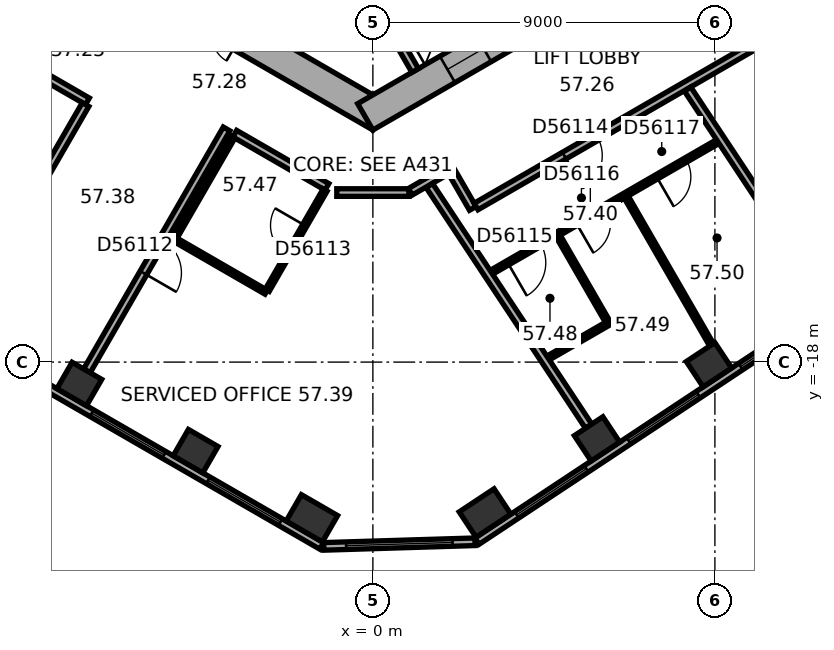
"""IFC4 building model, lengths in metres.
Left out: names, types, materials, properties, quantities, classifications, styles, units other than length and angle.
Written with IfcOpenShell. Run it as: python <this file> out.ifc"""

import sys

from ifc_helpers import new_model, si_unit, direction, frame, frame_2d, origin, origin_2d, place, context, subcontext, project, spatial, rectangle, extrude, element, fill, save


model = new_model("IFC4")
c1 = context("Model", 3, precision=1e-05, world=origin(), true_north=direction((0.0, 1.0)))
c2 = subcontext(c1, "Body", "Model", "MODEL_VIEW")
j1 = project(units=[si_unit("LENGTHUNIT", "METRE"), si_unit("PLANEANGLEUNIT", "RADIAN")], contexts=[c1])
p1 = place(None, origin())
s1 = spatial("IfcSite", under=j1, at=p1, CompositionType="ELEMENT")
p2 = place(p1, origin())
s2 = spatial("IfcBuilding", under=s1, at=p2, CompositionType="ELEMENT")
p3 = place(p2, frame((0.0, 0.0, 232.8)))
s3 = spatial("IfcBuildingStorey", under=s2, at=p3, CompositionType="ELEMENT", Elevation=232.8)
for number, where, z_axis, x_axis in (
    (1, (-7.725, -18.576, 0.0), (0.0, 0.0, 1.0), (0.866, -0.5, 0.0)),
    (2, (-4.665, -20.343, 0.0), (0.0, 0.0, 1.0), (0.866, -0.5, 0.0)),
):
    element("IfcColumn", number, at=place(p3, frame(where, z_axis=z_axis, x_axis=x_axis)), inside=s3, PredefinedType="COLUMN", context=c2, shape_type="SweptSolid", body=[
        extrude(rectangle(XDim=0.9, YDim=0.8, at=origin_2d()), origin(), (0.0, 0.0, 1.0), 3.7),
    ])
for number, where, z_axis, x_axis in (
    (3, (-1.604, -22.11, 0.0), (0.0, 0.0, 1.0), (0.866, -0.5, 0.0)),
    (4, (2.951, -21.971, 0.0), (0.0, 0.0, 1.0), (0.834, 0.552, 0.0)),
):
    element("IfcColumn", number, at=place(p3, frame(where, z_axis=z_axis, x_axis=x_axis)), inside=s3, PredefinedType="COLUMN", context=c2, shape_type="SweptSolid", body=[
        extrude(rectangle(XDim=1.1, YDim=0.8, at=origin_2d()), origin(), (0.0, 0.0, 1.0), 3.7),
    ])
for number, where, z_axis, x_axis in (
    (5, (5.898, -20.021, 0.0), (0.0, 0.0, 1.0), (0.834, 0.552, 0.0)),
    (6, (8.844, -18.07, 0.0), (0.0, 0.0, 1.0), (0.834, 0.552, 0.0)),
):
    element("IfcColumn", number, at=place(p3, frame(where, z_axis=z_axis, x_axis=x_axis)), inside=s3, PredefinedType="COLUMN", context=c2, shape_type="SweptSolid", body=[
        extrude(rectangle(XDim=0.9, YDim=0.8, at=origin_2d()), origin(), (0.0, 0.0, 1.0), 3.7),
    ])
p4 = place(p3, frame((-10.1, -5.6, 0.0), z_axis=(0.0, 0.0, 1.0), x_axis=(0.866023897231, -0.500002609418, 0.0)))
e7 = element("IfcWall", 7, at=p4, inside=s3, PredefinedType="SHEAR", context=c2, shape_type="SweptSolid", body=[
    extrude(rectangle(XDim=11.894, YDim=0.8, at=frame_2d((5.947, 0.0))), origin(), (0.0, 0.0, 1.0), 3.7),
])
p5 = place(p4, frame((6.147, 0.0, 0.0)))
e8 = element("IfcOpeningElement", 8, at=p5, cuts=e7, PredefinedType="OPENING", context=c2, shape_type="SweptSolid", body=[
    extrude(rectangle(XDim=1.5, YDim=2.1, at=frame_2d((0.75, 1.05))), frame((0.0, 0.41, 0.0), z_axis=(0.0, -1.0, 0.0), x_axis=(1.0, 0.0, 0.0)), (0.0, 0.0, 1.0), 0.82),
])
p6 = place(p4, frame((1.597, 0.0, 0.0)))
e9 = element("IfcOpeningElement", 9, at=p6, cuts=e7, PredefinedType="OPENING", context=c2, shape_type="SweptSolid", body=[
    extrude(rectangle(XDim=1.1, YDim=2.1, at=frame_2d((0.55, 1.05))), frame((0.0, 0.41, 0.0), z_axis=(0.0, -1.0, 0.0), x_axis=(1.0, 0.0, 0.0)), (0.0, 0.0, 1.0), 0.82),
])
p7 = place(p4, frame((4.197, 0.0, 0.0)))
e10 = element("IfcOpeningElement", 10, at=p7, cuts=e7, PredefinedType="OPENING", context=c2, shape_type="SweptSolid", body=[
    extrude(rectangle(XDim=1.1, YDim=2.1, at=frame_2d((0.55, 1.05))), frame((0.0, 0.41, 0.0), z_axis=(0.0, -1.0, 0.0), x_axis=(1.0, 0.0, 0.0)), (0.0, 0.0, 1.0), 0.82),
])
p8 = place(p3, frame((-0.2, -11.547, 0.0), z_axis=(0.0, 0.0, 1.0), x_axis=(0.866023897231, 0.500002609418, 0.0)))
e11 = element("IfcWall", 11, at=p8, inside=s3, PredefinedType="SHEAR", context=c2, shape_type="SweptSolid", body=[
    extrude(rectangle(XDim=11.894, YDim=0.8, at=frame_2d((5.947, 0.0))), origin(), (0.0, 0.0, 1.0), 3.7),
])
p9 = place(p8, frame((2.497, 0.0, 0.0)))
e12 = element("IfcOpeningElement", 12, at=p9, cuts=e11, PredefinedType="OPENING", context=c2, shape_type="SweptSolid", body=[
    extrude(rectangle(XDim=1.1, YDim=2.1, at=frame_2d((0.55, 1.05))), frame((0.0, 0.41, 0.0), z_axis=(0.0, -1.0, 0.0), x_axis=(1.0, 0.0, 0.0)), (0.0, 0.0, 1.0), 0.82),
])
p10 = place(p8, frame((5.097, 0.0, 0.0)))
e13 = element("IfcOpeningElement", 13, at=p10, cuts=e11, PredefinedType="OPENING", context=c2, shape_type="SweptSolid", body=[
    extrude(rectangle(XDim=1.1, YDim=2.1, at=frame_2d((0.55, 1.05))), frame((0.0, 0.41, 0.0), z_axis=(0.0, -1.0, 0.0), x_axis=(1.0, 0.0, 0.0)), (0.0, 0.0, 1.0), 0.82),
])
p11 = place(p8, frame((7.697, 0.0, 0.0)))
e14 = element("IfcOpeningElement", 14, at=p11, cuts=e11, PredefinedType="OPENING", context=c2, shape_type="SweptSolid", body=[
    extrude(rectangle(XDim=1.1, YDim=2.1, at=frame_2d((0.55, 1.05))), frame((0.0, 0.41, 0.0), z_axis=(0.0, -1.0, 0.0), x_axis=(1.0, 0.0, 0.0)), (0.0, 0.0, 1.0), 0.82),
])
p12 = place(p3, frame((-17.664, -13.415, 0.0), z_axis=(0.0, 0.0, 1.0), x_axis=(0.866026555358, -0.49999800541, 0.0)))
e15 = element("IfcWall", 15, at=p12, inside=s3, PredefinedType="STANDARD", context=c2, shape_type="SweptSolid", body=[
    extrude(rectangle(XDim=18.841, YDim=0.2, at=frame_2d((9.421, 0.0))), origin(), (0.0, 0.0, 1.0), 3.7),
])
p13 = place(p12, frame((1.254, 0.0, 0.9)))
e16 = element("IfcOpeningElement", 16, at=p13, cuts=e15, PredefinedType="OPENING", context=c2, shape_type="SweptSolid", body=[
    extrude(rectangle(XDim=2.2, YDim=2.0, at=frame_2d((1.1, 1.0))), frame((0.0, 0.11, 0.0), z_axis=(0.0, -1.0, 0.0), x_axis=(1.0, 0.0, 0.0)), (0.0, 0.0, 1.0), 0.22),
])
p14 = place(p12, frame((4.788, 0.0, 0.9)))
e17 = element("IfcOpeningElement", 17, at=p14, cuts=e15, PredefinedType="OPENING", context=c2, shape_type="SweptSolid", body=[
    extrude(rectangle(XDim=2.2, YDim=2.0, at=frame_2d((1.1, 1.0))), frame((0.0, 0.11, 0.0), z_axis=(0.0, -1.0, 0.0), x_axis=(1.0, 0.0, 0.0)), (0.0, 0.0, 1.0), 0.22),
])
p15 = place(p12, frame((8.322, 0.0, 0.9)))
e18 = element("IfcOpeningElement", 18, at=p15, cuts=e15, PredefinedType="OPENING", context=c2, shape_type="SweptSolid", body=[
    extrude(rectangle(XDim=2.2, YDim=2.0, at=frame_2d((1.1, 1.0))), frame((0.0, 0.11, 0.0), z_axis=(0.0, -1.0, 0.0), x_axis=(1.0, 0.0, 0.0)), (0.0, 0.0, 1.0), 0.22),
])
p16 = place(p12, frame((11.855, 0.0, 0.9)))
e19 = element("IfcOpeningElement", 19, at=p16, cuts=e15, PredefinedType="OPENING", context=c2, shape_type="SweptSolid", body=[
    extrude(rectangle(XDim=2.2, YDim=2.0, at=frame_2d((1.1, 1.0))), frame((0.0, 0.11, 0.0), z_axis=(0.0, -1.0, 0.0), x_axis=(1.0, 0.0, 0.0)), (0.0, 0.0, 1.0), 0.22),
])
p17 = place(p12, frame((15.389, 0.0, 0.9)))
e20 = element("IfcOpeningElement", 20, at=p17, cuts=e15, PredefinedType="OPENING", context=c2, shape_type="SweptSolid", body=[
    extrude(rectangle(XDim=2.2, YDim=2.0, at=frame_2d((1.1, 1.0))), frame((0.0, 0.11, 0.0), z_axis=(0.0, -1.0, 0.0), x_axis=(1.0, 0.0, 0.0)), (0.0, 0.0, 1.0), 0.22),
])
p18 = place(p3, frame((-1.294, -22.849, 0.0), z_axis=(0.0, 0.0, 1.0), x_axis=(0.999533952558, 0.030526671678, 0.0)))
e21 = element("IfcWall", 21, at=p18, inside=s3, PredefinedType="STANDARD", context=c2, shape_type="SweptSolid", body=[
    extrude(rectangle(XDim=3.983, YDim=0.2, at=frame_2d((1.991, 0.0))), origin(), (0.0, 0.0, 1.0), 3.7),
])
p19 = place(p18, frame((0.591, 0.0, 0.9)))
e22 = element("IfcOpeningElement", 22, at=p19, cuts=e21, PredefinedType="OPENING", context=c2, shape_type="SweptSolid", body=[
    extrude(rectangle(XDim=2.8, YDim=2.0, at=frame_2d((1.4, 1.0))), frame((0.0, 0.11, 0.0), z_axis=(0.0, -1.0, 0.0), x_axis=(1.0, 0.0, 0.0)), (0.0, 0.0, 1.0), 0.22),
])
p20 = place(p3, frame((2.739, -22.711, 0.0), z_axis=(0.0, 0.0, 1.0), x_axis=(0.833885723098, 0.551937134838, 0.0)))
e23 = element("IfcWall", 23, at=p20, inside=s3, PredefinedType="STANDARD", context=c2, shape_type="SweptSolid", body=[
    extrude(rectangle(XDim=18.841, YDim=0.2, at=frame_2d((9.421, 0.0))), origin(), (0.0, 0.0, 1.0), 3.7),
])
p21 = place(p20, frame((1.252, 0.0, 0.9)))
e24 = element("IfcOpeningElement", 24, at=p21, cuts=e23, PredefinedType="OPENING", context=c2, shape_type="SweptSolid", body=[
    extrude(rectangle(XDim=2.2, YDim=2.0, at=frame_2d((1.1, 1.0))), frame((0.0, 0.11, 0.0), z_axis=(0.0, -1.0, 0.0), x_axis=(1.0, 0.0, 0.0)), (0.0, 0.0, 1.0), 0.22),
])
p22 = place(p20, frame((4.786, 0.0, 0.9)))
e25 = element("IfcOpeningElement", 25, at=p22, cuts=e23, PredefinedType="OPENING", context=c2, shape_type="SweptSolid", body=[
    extrude(rectangle(XDim=2.2, YDim=2.0, at=frame_2d((1.1, 1.0))), frame((0.0, 0.11, 0.0), z_axis=(0.0, -1.0, 0.0), x_axis=(1.0, 0.0, 0.0)), (0.0, 0.0, 1.0), 0.22),
])
p23 = place(p20, frame((8.32, 0.0, 0.9)))
e26 = element("IfcOpeningElement", 26, at=p23, cuts=e23, PredefinedType="OPENING", context=c2, shape_type="SweptSolid", body=[
    extrude(rectangle(XDim=2.2, YDim=2.0, at=frame_2d((1.1, 1.0))), frame((0.0, 0.11, 0.0), z_axis=(0.0, -1.0, 0.0), x_axis=(1.0, 0.0, 0.0)), (0.0, 0.0, 1.0), 0.22),
])
p24 = place(p20, frame((11.854, 0.0, 0.9)))
e27 = element("IfcOpeningElement", 27, at=p24, cuts=e23, PredefinedType="OPENING", context=c2, shape_type="SweptSolid", body=[
    extrude(rectangle(XDim=2.2, YDim=2.0, at=frame_2d((1.1, 1.0))), frame((0.0, 0.11, 0.0), z_axis=(0.0, -1.0, 0.0), x_axis=(1.0, 0.0, 0.0)), (0.0, 0.0, 1.0), 0.22),
])
p25 = place(p20, frame((15.387, 0.0, 0.9)))
e28 = element("IfcOpeningElement", 28, at=p25, cuts=e23, PredefinedType="OPENING", context=c2, shape_type="SweptSolid", body=[
    extrude(rectangle(XDim=2.2, YDim=2.0, at=frame_2d((1.1, 1.0))), frame((0.0, 0.11, 0.0), z_axis=(0.0, -1.0, 0.0), x_axis=(1.0, 0.0, 0.0)), (0.0, 0.0, 1.0), 0.22),
])
p26 = place(p3, frame((0.013, -8.422, 0.0), z_axis=(0.0, 0.0, 1.0), x_axis=(0.500077893725, -0.86598042715, 0.0)))
e29 = element("IfcWall", 29, at=p26, inside=s3, PredefinedType="PARTITIONING", context=c2, shape_type="SweptSolid", body=[
    extrude(rectangle(XDim=2.2, YDim=0.2, at=frame_2d((1.1, 0.0))), origin(), (0.0, 0.0, 1.0), 3.42),
])
p27 = place(p3, frame((-11.551, -8.805, 0.0), z_axis=(0.0, 0.0, 1.0), x_axis=(0.866038310922, -0.499977643516, 0.0)))
e30 = element("IfcWall", 30, at=p27, inside=s3, PredefinedType="PARTITIONING", context=c2, shape_type="SweptSolid", body=[
    extrude(rectangle(XDim=4.665, YDim=0.2, at=frame_2d((2.333, 0.0))), origin(), (0.0, 0.0, 1.0), 3.42),
])
p28 = place(p3, frame((-10.585, -16.463, 0.0), z_axis=(0.0, 0.0, 1.0), x_axis=(0.499993802756, 0.866028981735, 0.0)))
e31 = element("IfcWall", 31, at=p28, inside=s3, PredefinedType="PARTITIONING", context=c2, shape_type="SweptSolid", body=[
    extrude(rectangle(XDim=6.049, YDim=0.2, at=frame_2d((3.024, 0.0))), origin(), (0.0, 0.0, 1.0), 2.87),
])
p29 = place(p28, frame((2.524, 0.0, 0.0)))
e32 = element("IfcOpeningElement", 32, at=p29, cuts=e31, PredefinedType="OPENING", context=c2, shape_type="SweptSolid", body=[
    extrude(rectangle(XDim=1.0, YDim=2.1, at=frame_2d((0.5, 1.05))), frame((0.0, 0.11, 0.0), z_axis=(0.0, -1.0, 0.0), x_axis=(1.0, 0.0, 0.0)), (0.0, 0.0, 1.0), 0.22),
])
p30 = place(p3, frame((-7.525, -18.23, 0.0), z_axis=(0.0, 0.0, 1.0), x_axis=(0.499983153418, 0.866035129944, 0.0)))
e33 = element("IfcWall", 33, at=p30, inside=s3, PredefinedType="PARTITIONING", context=c2, shape_type="SweptSolid", body=[
    extrude(rectangle(XDim=7.35, YDim=0.2, at=frame_2d((3.675, 0.0))), origin(), (0.0, 0.0, 1.0), 3.42),
])
p31 = place(p30, frame((2.975, 0.0, 0.0)))
e34 = element("IfcOpeningElement", 34, at=p31, cuts=e33, PredefinedType="OPENING", context=c2, shape_type="SweptSolid", body=[
    extrude(rectangle(XDim=1.0, YDim=2.1, at=frame_2d((0.5, 1.05))), frame((0.0, 0.11, 0.0), z_axis=(0.0, -1.0, 0.0), x_axis=(1.0, 0.0, 0.0)), (0.0, 0.0, 1.0), 0.22),
])
p32 = place(p3, frame((-5.233, -14.761, 0.0), z_axis=(0.0, 0.0, 1.0), x_axis=(0.499967891604, 0.866043940782, 0.0)))
e35 = element("IfcWall", 35, at=p32, inside=s3, PredefinedType="PARTITIONING", context=c2, shape_type="SweptSolid", body=[
    extrude(rectangle(XDim=3.1, YDim=0.12, at=frame_2d((1.55, 0.0))), origin(), (0.0, 0.0, 1.0), 3.42),
])
p33 = place(p3, frame((-3.634, -11.99, 0.0), z_axis=(0.0, 0.0, 1.0), x_axis=(0.866018616679, -0.500011755427, 0.0)))
e36 = element("IfcWall", 36, at=p33, inside=s3, PredefinedType="PARTITIONING", context=c2, shape_type="SweptSolid", body=[
    extrude(rectangle(XDim=2.8, YDim=0.2, at=frame_2d((1.4, 0.0))), origin(), (0.0, 0.0, 1.0), 3.42),
])
p34 = place(p3, frame((-2.809, -16.161, 0.0), z_axis=(0.0, 0.0, 1.0), x_axis=(-0.865997131366, 0.500048966069, 0.0)))
e37 = element("IfcWall", 37, at=p34, inside=s3, PredefinedType="PARTITIONING", context=c2, shape_type="SweptSolid", body=[
    extrude(rectangle(XDim=2.74, YDim=0.12, at=frame_2d((1.37, 0.0))), origin(), (0.0, 0.0, 1.0), 3.42),
])
p35 = place(p3, frame((-1.259, -13.476, 0.0), z_axis=(0.0, 0.0, 1.0), x_axis=(-0.500026023896, -0.86601037836, 0.0)))
e38 = element("IfcWall", 38, at=p35, inside=s3, PredefinedType="PARTITIONING", context=c2, shape_type="SweptSolid", body=[
    extrude(rectangle(XDim=3.04, YDim=0.12, at=frame_2d((1.52, 0.0))), origin(), (0.0, 0.0, 1.0), 3.42),
])
p36 = place(p35, frame((1.07, 0.0, 0.0)))
e39 = element("IfcOpeningElement", 39, at=p36, cuts=e38, PredefinedType="OPENING", context=c2, shape_type="SweptSolid", body=[
    extrude(rectangle(XDim=0.9, YDim=2.1, at=frame_2d((0.45, 1.05))), frame((0.0, 0.07, 0.0), z_axis=(0.0, -1.0, 0.0), x_axis=(1.0, 0.0, 0.0)), (0.0, 0.0, 1.0), 0.14),
])
p37 = place(p3, frame((-0.95, -13.539, 0.0), z_axis=(0.0, 0.0, 1.0), x_axis=(1.0, 0.0, 0.0)))
e40 = element("IfcWall", 40, at=p37, inside=s3, PredefinedType="PARTITIONING", context=c2, shape_type="SweptSolid", body=[
    extrude(rectangle(XDim=1.9, YDim=0.2, at=frame_2d((0.95, 0.0))), origin(), (0.0, 0.0, 1.0), 3.42),
])
p38 = place(p3, frame((0.985, -13.519, 0.0), z_axis=(0.0, 0.0, 1.0), x_axis=(0.866054082991, 0.499950322867, 0.0)))
e41 = element("IfcWall", 41, at=p38, inside=s3, PredefinedType="PARTITIONING", context=c2, shape_type="SweptSolid", body=[
    extrude(rectangle(XDim=1.206, YDim=0.2, at=frame_2d((0.603, 0.0))), origin(), (0.0, 0.0, 1.0), 3.42),
])
p39 = place(p3, frame((2.079, -13.003, 0.0), z_axis=(0.0, 0.0, 1.0), x_axis=(0.500074377092, -0.865982457891, 0.0)))
e42 = element("IfcWall", 42, at=p39, inside=s3, PredefinedType="PARTITIONING", context=c2, shape_type="SweptSolid", body=[
    extrude(rectangle(XDim=1.101, YDim=0.2, at=frame_2d((0.55, 0.0))), origin(), (0.0, 0.0, 1.0), 3.42),
])
p40 = place(p3, frame((2.716, -13.906, 0.0), z_axis=(0.0, 0.0, 1.0), x_axis=(0.866040290674, 0.499974214264, 0.0)))
e43 = element("IfcWall", 43, at=p40, inside=s3, PredefinedType="PARTITIONING", context=c2, shape_type="SweptSolid", body=[
    extrude(rectangle(XDim=8.702, YDim=0.2, at=frame_2d((4.351, 0.0))), origin(), (0.0, 0.0, 1.0), 3.42),
])
p41 = place(p40, frame((2.679, 0.0, 0.0)))
e44 = element("IfcOpeningElement", 44, at=p41, cuts=e43, PredefinedType="OPENING", context=c2, shape_type="SweptSolid", body=[
    extrude(rectangle(XDim=1.0, YDim=2.1, at=frame_2d((0.5, 1.05))), frame((0.0, 0.11, 0.0), z_axis=(0.0, -1.0, 0.0), x_axis=(1.0, 0.0, 0.0)), (0.0, 0.0, 1.0), 0.22),
])
p42 = place(p3, frame((3.117, -15.638, 0.0), z_axis=(0.0, 0.0, 1.0), x_axis=(0.866031365477, 0.499989673903, 0.0)))
e45 = element("IfcWall", 45, at=p42, inside=s3, PredefinedType="PARTITIONING", context=c2, shape_type="SweptSolid", body=[
    extrude(rectangle(XDim=6.881, YDim=0.12, at=frame_2d((3.44, 0.0))), origin(), (0.0, 0.0, 1.0), 3.42),
])
p43 = place(p42, frame((0.5, 0.0, 0.0)))
e46 = element("IfcOpeningElement", 46, at=p43, cuts=e45, PredefinedType="OPENING", context=c2, shape_type="SweptSolid", body=[
    extrude(rectangle(XDim=1.0, YDim=2.1, at=frame_2d((0.5, 1.05))), frame((0.0, 0.07, 0.0), z_axis=(0.0, -1.0, 0.0), x_axis=(1.0, 0.0, 0.0)), (0.0, 0.0, 1.0), 0.14),
])
p44 = place(p42, frame((2.583, 0.0, 0.0)))
e47 = element("IfcOpeningElement", 47, at=p44, cuts=e45, PredefinedType="OPENING", context=c2, shape_type="SweptSolid", body=[
    extrude(rectangle(XDim=0.9, YDim=2.1, at=frame_2d((0.45, 1.05))), frame((0.0, 0.07, 0.0), z_axis=(0.0, -1.0, 0.0), x_axis=(1.0, 0.0, 0.0)), (0.0, 0.0, 1.0), 0.14),
])
p45 = place(p42, frame((5.023, 0.0, 0.0)))
e48 = element("IfcOpeningElement", 48, at=p45, cuts=e45, PredefinedType="OPENING", context=c2, shape_type="SweptSolid", body=[
    extrude(rectangle(XDim=0.9, YDim=2.1, at=frame_2d((0.45, 1.05))), frame((0.0, 0.07, 0.0), z_axis=(0.0, -1.0, 0.0), x_axis=(1.0, 0.0, 0.0)), (0.0, 0.0, 1.0), 0.14),
])
p46 = place(p3, frame((4.61, -17.893, 0.0), z_axis=(0.0, 0.0, 1.0), x_axis=(0.866023842607, 0.500002704028, 0.0)))
e49 = element("IfcWall", 49, at=p46, inside=s3, PredefinedType="PARTITIONING", context=c2, shape_type="SweptSolid", body=[
    extrude(rectangle(XDim=1.835, YDim=0.12, at=frame_2d((0.917, 0.0))), origin(), (0.0, 0.0, 1.0), 3.42),
])
p47 = place(p3, frame((5.677, -19.687, 0.0), z_axis=(0.0, 0.0, 1.0), x_axis=(-0.551936619203, 0.833886064389, 0.0)))
e50 = element("IfcWall", 50, at=p47, inside=s3, PredefinedType="PARTITIONING", context=c2, shape_type="SweptSolid", body=[
    extrude(rectangle(XDim=7.592, YDim=0.2, at=frame_2d((3.796, 0.0))), origin(), (0.0, 0.0, 1.0), 3.42),
])
p48 = place(p3, frame((6.169, -16.924, 0.0), z_axis=(0.0, 0.0, 1.0), x_axis=(-0.500047388771, 0.865998042136, 0.0)))
e51 = element("IfcWall", 51, at=p48, inside=s3, PredefinedType="PARTITIONING", context=c2, shape_type="SweptSolid", body=[
    extrude(rectangle(XDim=2.58, YDim=0.12, at=frame_2d((1.29, 0.0))), origin(), (0.0, 0.0, 1.0), 3.42),
])
p49 = place(p3, frame((8.912, -17.545, 0.0), z_axis=(0.0, 0.0, 1.0), x_axis=(-0.500022113525, 0.866012636158, 0.0)))
e52 = element("IfcWall", 52, at=p49, inside=s3, PredefinedType="PARTITIONING", context=c2, shape_type="SweptSolid", body=[
    extrude(rectangle(XDim=4.49, YDim=0.12, at=frame_2d((2.245, 0.0))), origin(), (0.0, 0.0, 1.0), 2.87),
])
p50 = place(p3, frame((11.571, -15.786, 0.0), z_axis=(0.0, 0.0, 1.0), x_axis=(-0.551944861763, 0.833880608705, 0.0)))
e53 = element("IfcWall", 53, at=p50, inside=s3, PredefinedType="PARTITIONING", context=c2, shape_type="SweptSolid", body=[
    extrude(rectangle(XDim=5.957, YDim=0.2, at=frame_2d((2.979, 0.0))), origin(), (0.0, 0.0, 1.0), 3.42),
])
p51 = place(p16, origin())
e54 = element("IfcWindow", 54, at=p51, inside=s3, PartitioningType="SINGLE_PANEL", PredefinedType="WINDOW", context=c2, shape_type="SweptSolid", body=[
    extrude(rectangle(XDim=2.2, YDim=2.0, at=frame_2d((1.1, 1.0))), frame((0.0, 0.03, 0.0), z_axis=(0.0, -1.0, 0.0), x_axis=(1.0, 0.0, 0.0)), (0.0, 0.0, 1.0), 0.06),
])
fill(e19, e54)
p52 = place(p17, origin())
e55 = element("IfcWindow", 55, at=p52, inside=s3, PartitioningType="SINGLE_PANEL", PredefinedType="WINDOW", context=c2, shape_type="SweptSolid", body=[
    extrude(rectangle(XDim=2.2, YDim=2.0, at=frame_2d((1.1, 1.0))), frame((0.0, 0.03, 0.0), z_axis=(0.0, -1.0, 0.0), x_axis=(1.0, 0.0, 0.0)), (0.0, 0.0, 1.0), 0.06),
])
fill(e20, e55)
p53 = place(p19, origin())
e56 = element("IfcWindow", 56, at=p53, inside=s3, PartitioningType="SINGLE_PANEL", PredefinedType="WINDOW", context=c2, shape_type="SweptSolid", body=[
    extrude(rectangle(XDim=2.8, YDim=2.0, at=frame_2d((1.4, 1.0))), frame((0.0, 0.03, 0.0), z_axis=(0.0, -1.0, 0.0), x_axis=(1.0, 0.0, 0.0)), (0.0, 0.0, 1.0), 0.06),
])
fill(e22, e56)
p54 = place(p21, origin())
e57 = element("IfcWindow", 57, at=p54, inside=s3, PartitioningType="SINGLE_PANEL", PredefinedType="WINDOW", context=c2, shape_type="SweptSolid", body=[
    extrude(rectangle(XDim=2.2, YDim=2.0, at=frame_2d((1.1, 1.0))), frame((0.0, 0.03, 0.0), z_axis=(0.0, -1.0, 0.0), x_axis=(1.0, 0.0, 0.0)), (0.0, 0.0, 1.0), 0.06),
])
fill(e24, e57)
p55 = place(p22, origin())
e58 = element("IfcWindow", 58, at=p55, inside=s3, PartitioningType="SINGLE_PANEL", PredefinedType="WINDOW", context=c2, shape_type="SweptSolid", body=[
    extrude(rectangle(XDim=2.2, YDim=2.0, at=frame_2d((1.1, 1.0))), frame((0.0, 0.03, 0.0), z_axis=(0.0, -1.0, 0.0), x_axis=(1.0, 0.0, 0.0)), (0.0, 0.0, 1.0), 0.06),
])
fill(e25, e58)
p56 = place(p23, origin())
e59 = element("IfcWindow", 59, at=p56, inside=s3, PartitioningType="SINGLE_PANEL", PredefinedType="WINDOW", context=c2, shape_type="SweptSolid", body=[
    extrude(rectangle(XDim=2.2, YDim=2.0, at=frame_2d((1.1, 1.0))), frame((0.0, 0.03, 0.0), z_axis=(0.0, -1.0, 0.0), x_axis=(1.0, 0.0, 0.0)), (0.0, 0.0, 1.0), 0.06),
])
fill(e26, e59)
p57 = place(p9, origin())
e60 = element("IfcDoor", 60, at=p57, inside=s3, OperationType="DOUBLE_DOOR_SLIDING", PredefinedType="DOOR", context=c2, shape_type="SweptSolid", body=[
    extrude(rectangle(XDim=1.1, YDim=2.1, at=frame_2d((0.55, 1.05))), frame((0.0, 0.025, 0.0), z_axis=(0.0, -1.0, 0.0), x_axis=(1.0, 0.0, 0.0)), (0.0, 0.0, 1.0), 0.05),
])
fill(e12, e60)
p58 = place(p31, origin())
e61 = element("IfcDoor", 61, at=p58, inside=s3, OperationType="SINGLE_SWING_LEFT", PredefinedType="DOOR", context=c2, shape_type="SweptSolid", body=[
    extrude(rectangle(XDim=1.0, YDim=2.1, at=frame_2d((0.5, 1.05))), frame((0.0, 0.025, 0.0), z_axis=(0.0, -1.0, 0.0), x_axis=(1.0, 0.0, 0.0)), (0.0, 0.0, 1.0), 0.05),
])
fill(e34, e61)
p59 = place(p36, origin())
e62 = element("IfcDoor", 62, at=p59, inside=s3, OperationType="SINGLE_SWING_LEFT", PredefinedType="DOOR", context=c2, shape_type="SweptSolid", body=[
    extrude(rectangle(XDim=0.9, YDim=2.1, at=frame_2d((0.45, 1.05))), frame((0.0, 0.025, 0.0), z_axis=(0.0, -1.0, 0.0), x_axis=(1.0, 0.0, 0.0)), (0.0, 0.0, 1.0), 0.05),
])
fill(e39, e62)
p60 = place(p41, origin())
e63 = element("IfcDoor", 63, at=p60, inside=s3, OperationType="SINGLE_SWING_LEFT", PredefinedType="DOOR", context=c2, shape_type="SweptSolid", body=[
    extrude(rectangle(XDim=1.0, YDim=2.1, at=frame_2d((0.5, 1.05))), frame((0.0, 0.025, 0.0), z_axis=(0.0, -1.0, 0.0), x_axis=(1.0, 0.0, 0.0)), (0.0, 0.0, 1.0), 0.05),
])
fill(e44, e63)
p61 = place(p43, origin())
e64 = element("IfcDoor", 64, at=p61, inside=s3, OperationType="SINGLE_SWING_LEFT", PredefinedType="DOOR", context=c2, shape_type="SweptSolid", body=[
    extrude(rectangle(XDim=1.0, YDim=2.1, at=frame_2d((0.5, 1.05))), frame((0.0, 0.025, 0.0), z_axis=(0.0, -1.0, 0.0), x_axis=(1.0, 0.0, 0.0)), (0.0, 0.0, 1.0), 0.05),
])
fill(e46, e64)
p62 = place(p44, origin())
e65 = element("IfcDoor", 65, at=p62, inside=s3, OperationType="SINGLE_SWING_LEFT", PredefinedType="DOOR", context=c2, shape_type="SweptSolid", body=[
    extrude(rectangle(XDim=0.9, YDim=2.1, at=frame_2d((0.45, 1.05))), frame((0.0, 0.025, 0.0), z_axis=(0.0, -1.0, 0.0), x_axis=(1.0, 0.0, 0.0)), (0.0, 0.0, 1.0), 0.05),
])
fill(e47, e65)
p63 = place(p45, origin())
e66 = element("IfcDoor", 66, at=p63, inside=s3, OperationType="SINGLE_SWING_LEFT", PredefinedType="DOOR", context=c2, shape_type="SweptSolid", body=[
    extrude(rectangle(XDim=0.9, YDim=2.1, at=frame_2d((0.45, 1.05))), frame((0.0, 0.025, 0.0), z_axis=(0.0, -1.0, 0.0), x_axis=(1.0, 0.0, 0.0)), (0.0, 0.0, 1.0), 0.05),
])
fill(e48, e66)
save(model, sys.argv[1])
